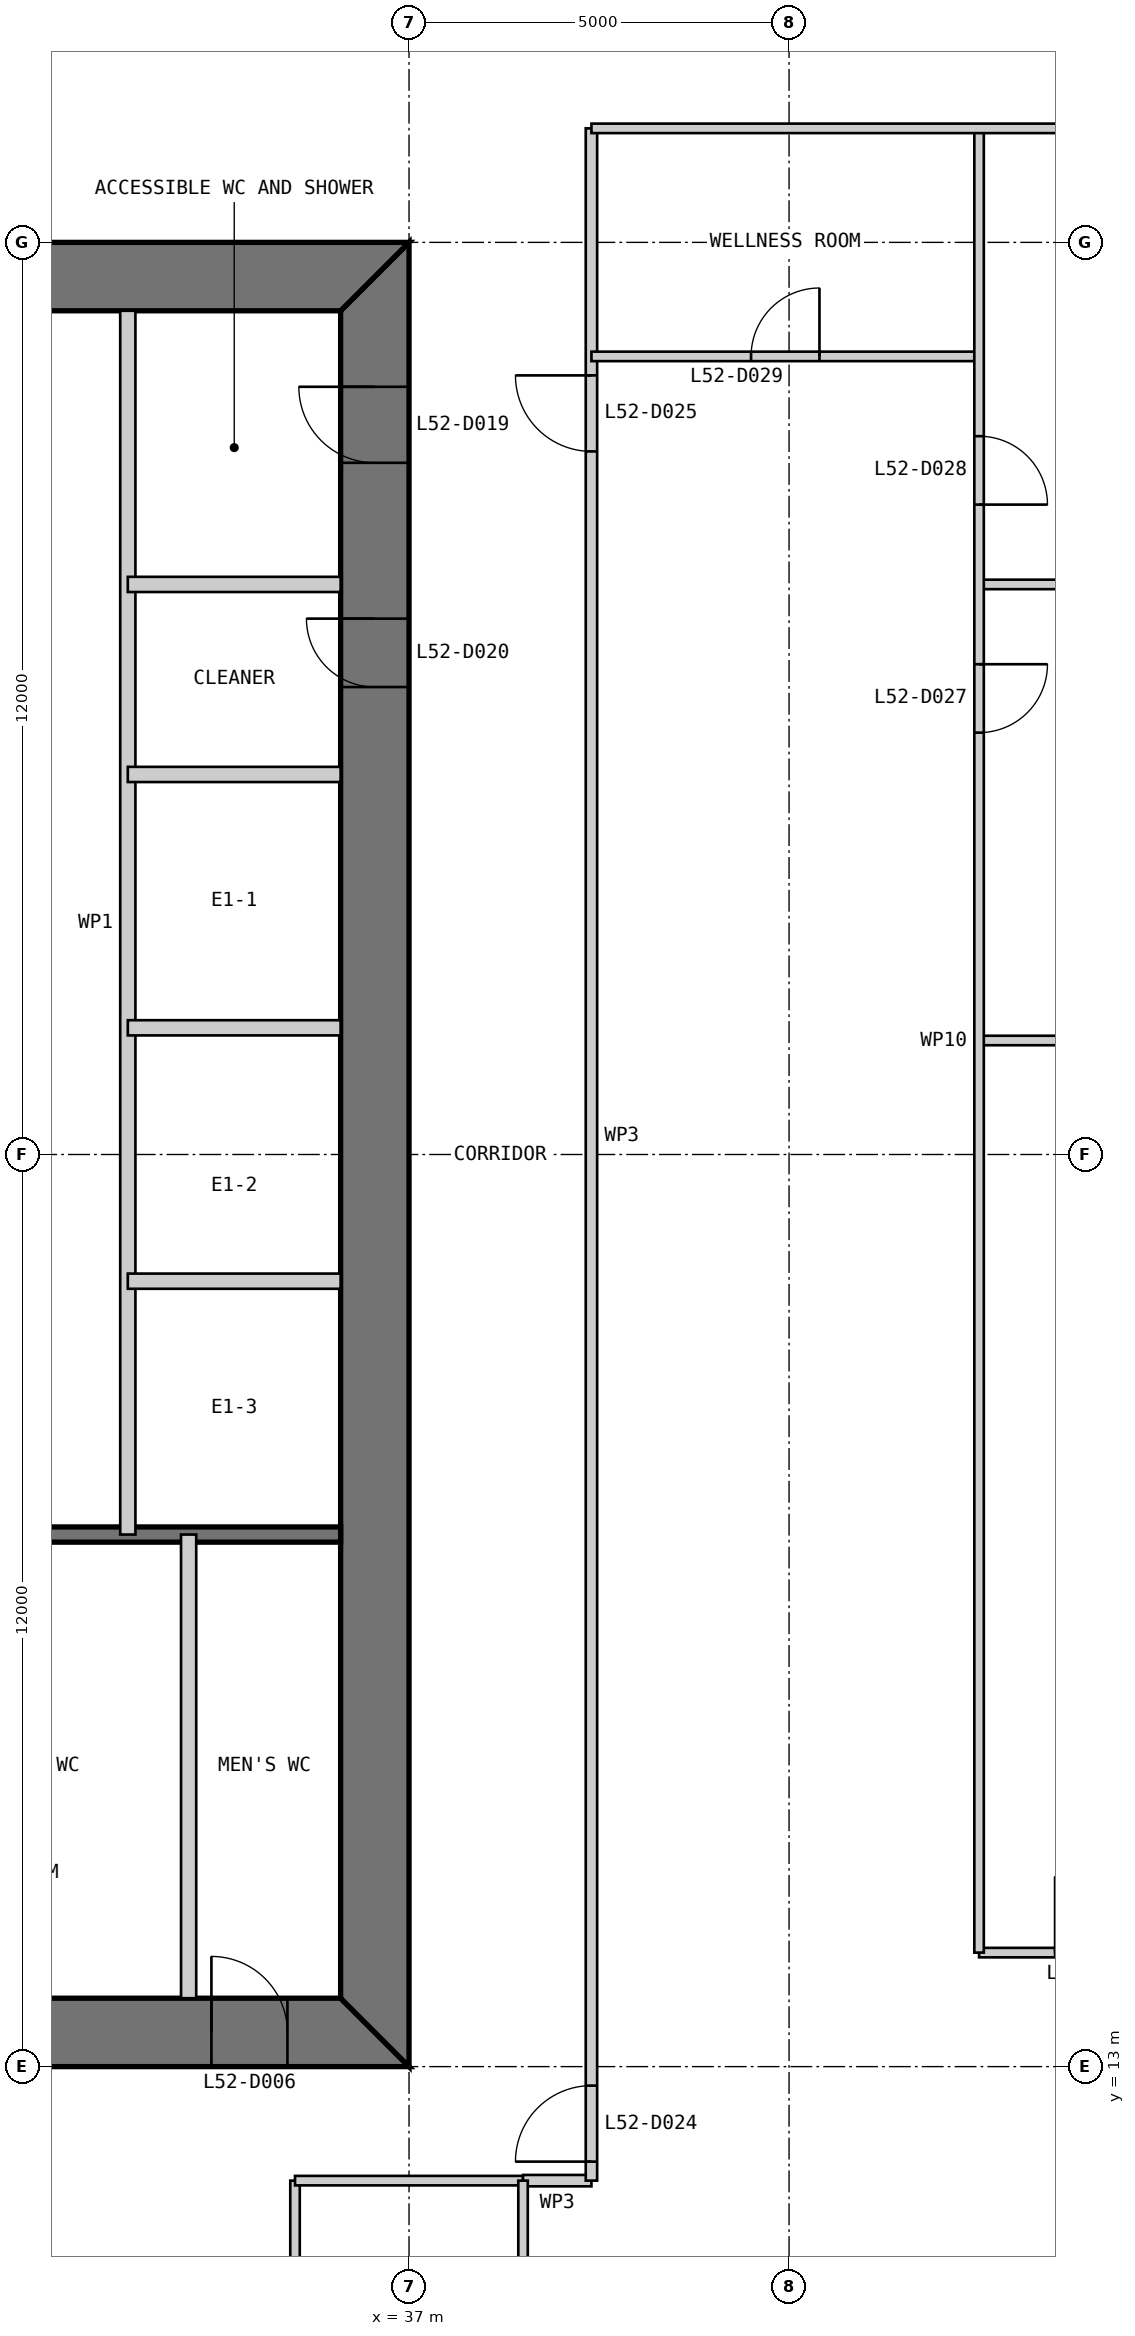
"""IFC4 building model, lengths in metres.
Left out: names, types, materials, properties, quantities, classifications, styles, units other than length and angle.
Written with IfcOpenShell. Run it as: python <this file> out.ifc"""

import sys

from ifc_helpers import new_model, si_unit, direction, frame, frame_2d, origin, place, context, subcontext, project, spatial, polyline, rectangle, outline, extrude, element, fill, save


model = new_model("IFC4")
c1 = context("Model", 3, precision=1e-05, world=origin(), true_north=direction((0.0, 1.0)))
c2 = subcontext(c1, "Body", "Model", "MODEL_VIEW")
j1 = project(units=[si_unit("LENGTHUNIT", "METRE"), si_unit("PLANEANGLEUNIT", "RADIAN")], contexts=[c1])
p1 = place(None, origin())
s1 = spatial("IfcSite", under=j1, at=p1, CompositionType="ELEMENT")
p2 = place(p1, origin())
s2 = spatial("IfcBuilding", under=s1, at=p2, CompositionType="ELEMENT")
p3 = place(p2, frame((0.0, 0.0, 221.8)))
s3 = spatial("IfcBuildingStorey", under=s2, at=p3, CompositionType="ELEMENT", Elevation=221.8)
p4 = place(p3, frame((13.0, 13.45, 0.0), z_axis=(0.0, 0.0, 1.0), x_axis=(1.0, 0.0, 0.0)))
e1 = element("IfcWall", 1, at=p4, inside=s3, PredefinedType="SHEAR", context=c2, shape_type="SweptSolid", body=[
    extrude(outline(polyline([(0.0, -0.45), (24.0, -0.45), (23.1, 0.45), (0.9, 0.45), (0.0, -0.45)])), origin(), (0.0, 0.0, 1.0), 4.0),
])
p5 = place(p4, frame((4.9, 0.0, 0.0)))
e2 = element("IfcOpeningElement", 2, at=p5, cuts=e1, PredefinedType="OPENING", context=c2, shape_type="SweptSolid", body=[
    extrude(rectangle(XDim=1.0, YDim=2.2, at=frame_2d((0.5, 1.1))), frame((0.0, 0.46, 0.0), z_axis=(0.0, -1.0, 0.0), x_axis=(1.0, 0.0, 0.0)), (0.0, 0.0, 1.0), 0.92),
])
p6 = place(p4, frame((8.9, 0.0, 0.0)))
e3 = element("IfcOpeningElement", 3, at=p6, cuts=e1, PredefinedType="OPENING", context=c2, shape_type="SweptSolid", body=[
    extrude(rectangle(XDim=1.1, YDim=2.2, at=frame_2d((0.55, 1.1))), frame((0.0, 0.46, 0.0), z_axis=(0.0, -1.0, 0.0), x_axis=(1.0, 0.0, 0.0)), (0.0, 0.0, 1.0), 0.92),
])
p7 = place(p4, frame((15.05, 0.0, 0.0)))
e4 = element("IfcOpeningElement", 4, at=p7, cuts=e1, PredefinedType="OPENING", context=c2, shape_type="SweptSolid", body=[
    extrude(rectangle(XDim=0.9, YDim=2.2, at=frame_2d((0.45, 1.1))), frame((0.0, 0.46, 0.0), z_axis=(0.0, -1.0, 0.0), x_axis=(1.0, 0.0, 0.0)), (0.0, 0.0, 1.0), 0.92),
])
p8 = place(p4, frame((17.9, 0.0, 0.0)))
e5 = element("IfcOpeningElement", 5, at=p8, cuts=e1, PredefinedType="OPENING", context=c2, shape_type="SweptSolid", body=[
    extrude(rectangle(XDim=1.0, YDim=2.2, at=frame_2d((0.5, 1.1))), frame((0.0, 0.46, 0.0), z_axis=(0.0, -1.0, 0.0), x_axis=(1.0, 0.0, 0.0)), (0.0, 0.0, 1.0), 0.92),
])
p9 = place(p4, frame((21.4, 0.0, 0.0)))
e6 = element("IfcOpeningElement", 6, at=p9, cuts=e1, PredefinedType="OPENING", context=c2, shape_type="SweptSolid", body=[
    extrude(rectangle(XDim=1.0, YDim=2.2, at=frame_2d((0.5, 1.1))), frame((0.0, 0.46, 0.0), z_axis=(0.0, -1.0, 0.0), x_axis=(1.0, 0.0, 0.0)), (0.0, 0.0, 1.0), 0.92),
])
p10 = place(p3, frame((36.55, 13.9, 0.0), z_axis=(0.0, 0.0, 1.0), x_axis=(0.0, 1.0, 0.0)))
e7 = element("IfcWall", 7, at=p10, inside=s3, PredefinedType="SHEAR", context=c2, shape_type="SweptSolid", body=[
    extrude(outline(polyline([(-0.9, -0.45), (23.1, -0.45), (22.2, 0.45), (0.0, 0.45), (-0.9, -0.45)])), origin(), (0.0, 0.0, 1.0), 4.0),
])
p11 = place(p10, frame((20.2, 0.0, 0.0)))
e8 = element("IfcOpeningElement", 8, at=p11, cuts=e7, PredefinedType="OPENING", context=c2, shape_type="SweptSolid", body=[
    extrude(rectangle(XDim=1.0, YDim=2.2, at=frame_2d((0.5, 1.1))), frame((0.0, 0.46, 0.0), z_axis=(0.0, -1.0, 0.0), x_axis=(1.0, 0.0, 0.0)), (0.0, 0.0, 1.0), 0.92),
])
p12 = place(p10, frame((17.25, 0.0, 0.0)))
e9 = element("IfcOpeningElement", 9, at=p12, cuts=e7, PredefinedType="OPENING", context=c2, shape_type="SweptSolid", body=[
    extrude(rectangle(XDim=0.9, YDim=2.2, at=frame_2d((0.45, 1.1))), frame((0.0, 0.46, 0.0), z_axis=(0.0, -1.0, 0.0), x_axis=(1.0, 0.0, 0.0)), (0.0, 0.0, 1.0), 0.92),
])
p13 = place(p3, frame((37.0, 36.55, 0.0), z_axis=(0.0, 0.0, 1.0), x_axis=(-1.0, 0.0, 0.0)))
e10 = element("IfcWall", 10, at=p13, inside=s3, PredefinedType="SHEAR", context=c2, shape_type="SweptSolid", body=[
    extrude(outline(polyline([(0.0, -0.45), (24.0, -0.45), (23.1, 0.45), (0.9, 0.45), (0.0, -0.45)])), origin(), (0.0, 0.0, 1.0), 4.0),
])
p14 = place(p13, frame((4.9, 0.0, 0.0)))
e11 = element("IfcOpeningElement", 11, at=p14, cuts=e10, PredefinedType="OPENING", context=c2, shape_type="SweptSolid", body=[
    extrude(rectangle(XDim=1.0, YDim=2.2, at=frame_2d((0.5, 1.1))), frame((0.0, 0.46, 0.0), z_axis=(0.0, -1.0, 0.0), x_axis=(1.0, 0.0, 0.0)), (0.0, 0.0, 1.0), 0.92),
])
p15 = place(p13, frame((8.9, 0.0, 0.0)))
e12 = element("IfcOpeningElement", 12, at=p15, cuts=e10, PredefinedType="OPENING", context=c2, shape_type="SweptSolid", body=[
    extrude(rectangle(XDim=1.1, YDim=2.2, at=frame_2d((0.55, 1.1))), frame((0.0, 0.46, 0.0), z_axis=(0.0, -1.0, 0.0), x_axis=(1.0, 0.0, 0.0)), (0.0, 0.0, 1.0), 0.92),
])
p16 = place(p13, frame((15.05, 0.0, 0.0)))
e13 = element("IfcOpeningElement", 13, at=p16, cuts=e10, PredefinedType="OPENING", context=c2, shape_type="SweptSolid", body=[
    extrude(rectangle(XDim=0.9, YDim=2.2, at=frame_2d((0.45, 1.1))), frame((0.0, 0.46, 0.0), z_axis=(0.0, -1.0, 0.0), x_axis=(1.0, 0.0, 0.0)), (0.0, 0.0, 1.0), 0.92),
])
p17 = place(p13, frame((17.9, 0.0, 0.0)))
e14 = element("IfcOpeningElement", 14, at=p17, cuts=e10, PredefinedType="OPENING", context=c2, shape_type="SweptSolid", body=[
    extrude(rectangle(XDim=1.0, YDim=2.2, at=frame_2d((0.5, 1.1))), frame((0.0, 0.46, 0.0), z_axis=(0.0, -1.0, 0.0), x_axis=(1.0, 0.0, 0.0)), (0.0, 0.0, 1.0), 0.92),
])
p18 = place(p13, frame((21.4, 0.0, 0.0)))
e15 = element("IfcOpeningElement", 15, at=p18, cuts=e10, PredefinedType="OPENING", context=c2, shape_type="SweptSolid", body=[
    extrude(rectangle(XDim=1.0, YDim=2.2, at=frame_2d((0.5, 1.1))), frame((0.0, 0.46, 0.0), z_axis=(0.0, -1.0, 0.0), x_axis=(1.0, 0.0, 0.0)), (0.0, 0.0, 1.0), 0.92),
])
p19 = place(p3, frame((20.3, 20.0, 0.0), z_axis=(0.0, 0.0, 1.0), x_axis=(1.0, 0.0, 0.0)))
e16 = element("IfcWall", 16, at=p19, inside=s3, PredefinedType="SOLIDWALL", context=c2, shape_type="SweptSolid", body=[
    extrude(rectangle(XDim=15.8, YDim=0.2, at=frame_2d((7.9, 0.0))), origin(), (0.0, 0.0, 1.0), 3.8),
])
p20 = place(p3, frame((34.1, 13.9, 0.0), z_axis=(0.0, 0.0, 1.0), x_axis=(0.0, 1.0, 0.0)))
e17 = element("IfcWall", 17, at=p20, inside=s3, PredefinedType="PARTITIONING", context=c2, shape_type="SweptSolid", body=[
    extrude(rectangle(XDim=6.1, YDim=0.2, at=frame_2d((3.05, 0.0))), origin(), (0.0, 0.0, 1.0), 3.8),
])
p21 = place(p3, frame((33.3, 36.1, 0.0), z_axis=(0.0, 0.0, 1.0), x_axis=(0.0, -1.0, 0.0)))
e18 = element("IfcWall", 18, at=p21, inside=s3, PredefinedType="PARTITIONING", context=c2, shape_type="SweptSolid", body=[
    extrude(rectangle(XDim=16.1, YDim=0.2, at=frame_2d((8.05, 0.0))), origin(), (0.0, 0.0, 1.0), 3.8),
])
for number, where, z_axis, x_axis in (
    (19, (36.1, 30.0, 0.0), (0.0, 0.0, 1.0), (-1.0, 0.0, 0.0)),
    (20, (36.1, 26.667, 0.0), (0.0, 0.0, 1.0), (-1.0, 0.0, 0.0)),
    (21, (36.1, 23.333, 0.0), (0.0, 0.0, 1.0), (-1.0, 0.0, 0.0)),
    (22, (36.1, 32.5, 0.0), (0.0, 0.0, 1.0), (-1.0, 0.0, 0.0)),
):
    element("IfcWall", number, at=place(p3, frame(where, z_axis=z_axis, x_axis=x_axis)), inside=s3, PredefinedType="PARTITIONING", context=c2, shape_type="SweptSolid", body=[
        extrude(rectangle(XDim=2.8, YDim=0.2, at=frame_2d((1.4, 0.0))), origin(), (0.0, 0.0, 1.0), 3.8),
    ])
p22 = place(p3, frame((35.5, 5.5, 0.0), z_axis=(0.0, 0.0, 1.0), x_axis=(0.0, 1.0, 0.0)))
e23 = element("IfcWall", 23, at=p22, inside=s3, PredefinedType="PARTITIONING", context=c2, shape_type="SweptSolid", body=[
    extrude(rectangle(XDim=6.0, YDim=0.125, at=frame_2d((3.0, 0.0))), origin(), (0.0, 0.0, 1.0), 3.85),
])
p23 = place(p22, frame((2.55, 0.0, 0.0)))
e24 = element("IfcOpeningElement", 24, at=p23, cuts=e23, PredefinedType="OPENING", context=c2, shape_type="SweptSolid", body=[
    extrude(rectangle(XDim=0.9, YDim=2.2, at=frame_2d((0.45, 1.1))), frame((0.0, 0.073, 0.0), z_axis=(0.0, -1.0, 0.0), x_axis=(1.0, 0.0, 0.0)), (0.0, 0.0, 1.0), 0.145),
])
p24 = place(p3, frame((35.5, 11.5, 0.0), z_axis=(0.0, 0.0, 1.0), x_axis=(1.0, 0.0, 0.0)))
e25 = element("IfcWall", 25, at=p24, inside=s3, PredefinedType="PARTITIONING", context=c2, shape_type="SweptSolid", body=[
    extrude(rectangle(XDim=3.0, YDim=0.125, at=frame_2d((1.5, 0.0))), origin(), (0.0, 0.0, 1.0), 3.85),
])
p25 = place(p3, frame((38.5, 11.5, 0.0), z_axis=(0.0, 0.0, 1.0), x_axis=(1.0, 0.0, 0.0)))
e26 = element("IfcWall", 26, at=p25, inside=s3, PredefinedType="PARTITIONING", context=c2, shape_type="SweptSolid", body=[
    extrude(rectangle(XDim=0.9, YDim=0.15, at=frame_2d((0.45, 0.0))), origin(), (0.0, 0.0, 1.0), 3.85),
])
p26 = place(p3, frame((39.4, 11.5, 0.0), z_axis=(0.0, 0.0, 1.0), x_axis=(0.0, 1.0, 0.0)))
e27 = element("IfcWall", 27, at=p26, inside=s3, PredefinedType="PARTITIONING", context=c2, shape_type="SweptSolid", body=[
    extrude(rectangle(XDim=27.0, YDim=0.15, at=frame_2d((13.5, 0.0))), origin(), (0.0, 0.0, 1.0), 3.85),
])
p27 = place(p26, frame((0.25, 0.0, 0.0)))
e28 = element("IfcOpeningElement", 28, at=p27, cuts=e27, PredefinedType="OPENING", context=c2, shape_type="SweptSolid", body=[
    extrude(rectangle(XDim=1.0, YDim=2.2, at=frame_2d((0.5, 1.1))), frame((0.0, 0.085, 0.0), z_axis=(0.0, -1.0, 0.0), x_axis=(1.0, 0.0, 0.0)), (0.0, 0.0, 1.0), 0.17),
])
p28 = place(p26, frame((22.75, 0.0, 0.0)))
e29 = element("IfcOpeningElement", 29, at=p28, cuts=e27, PredefinedType="OPENING", context=c2, shape_type="SweptSolid", body=[
    extrude(rectangle(XDim=1.0, YDim=2.2, at=frame_2d((0.5, 1.1))), frame((0.0, 0.085, 0.0), z_axis=(0.0, -1.0, 0.0), x_axis=(1.0, 0.0, 0.0)), (0.0, 0.0, 1.0), 0.17),
])
p29 = place(p3, frame((38.5, 0.15, 0.0), z_axis=(0.0, 0.0, 1.0), x_axis=(0.0, 1.0, 0.0)))
e30 = element("IfcWall", 30, at=p29, inside=s3, PredefinedType="PARTITIONING", context=c2, shape_type="SweptSolid", body=[
    extrude(rectangle(XDim=11.35, YDim=0.125, at=frame_2d((5.675, 0.0))), origin(), (0.0, 0.0, 1.0), 3.85),
])
p30 = place(p3, frame((49.85, 14.5, 0.0), z_axis=(0.0, 0.0, 1.0), x_axis=(-1.0, 0.0, 0.0)))
e31 = element("IfcWall", 31, at=p30, inside=s3, PredefinedType="PARTITIONING", context=c2, shape_type="SweptSolid", body=[
    extrude(rectangle(XDim=5.35, YDim=0.125, at=frame_2d((2.675, 0.0))), origin(), (0.0, 0.0, 1.0), 3.85),
])
p31 = place(p30, frame((3.35, 0.0, 0.0)))
e32 = element("IfcOpeningElement", 32, at=p31, cuts=e31, PredefinedType="OPENING", context=c2, shape_type="SweptSolid", body=[
    extrude(rectangle(XDim=1.0, YDim=2.2, at=frame_2d((0.5, 1.1))), frame((0.0, 0.073, 0.0), z_axis=(0.0, -1.0, 0.0), x_axis=(1.0, 0.0, 0.0)), (0.0, 0.0, 1.0), 0.145),
])
for number, where, z_axis, x_axis in (
    (33, (49.85, 26.5, 0.0), (0.0, 0.0, 1.0), (-1.0, 0.0, 0.0)),
    (34, (49.85, 32.5, 0.0), (0.0, 0.0, 1.0), (-1.0, 0.0, 0.0)),
):
    element("IfcWall", number, at=place(p3, frame(where, z_axis=z_axis, x_axis=x_axis)), inside=s3, PredefinedType="PARTITIONING", context=c2, shape_type="SweptSolid", body=[
        extrude(rectangle(XDim=5.35, YDim=0.125, at=frame_2d((2.675, 0.0))), origin(), (0.0, 0.0, 1.0), 3.85),
    ])
p32 = place(p3, frame((44.5, 35.5, 0.0), z_axis=(0.0, 0.0, 1.0), x_axis=(-1.0, 0.0, 0.0)))
e35 = element("IfcWall", 35, at=p32, inside=s3, PredefinedType="PARTITIONING", context=c2, shape_type="SweptSolid", body=[
    extrude(rectangle(XDim=5.1, YDim=0.125, at=frame_2d((2.55, 0.0))), origin(), (0.0, 0.0, 1.0), 3.85),
])
p33 = place(p32, frame((2.1, 0.0, 0.0)))
e36 = element("IfcOpeningElement", 36, at=p33, cuts=e35, PredefinedType="OPENING", context=c2, shape_type="SweptSolid", body=[
    extrude(rectangle(XDim=0.9, YDim=2.2, at=frame_2d((0.45, 1.1))), frame((0.0, 0.073, 0.0), z_axis=(0.0, -1.0, 0.0), x_axis=(1.0, 0.0, 0.0)), (0.0, 0.0, 1.0), 0.145),
])
p34 = place(p3, frame((44.5, 14.5, 0.0), z_axis=(0.0, 0.0, 1.0), x_axis=(0.0, 1.0, 0.0)))
e37 = element("IfcWall", 37, at=p34, inside=s3, PredefinedType="PARTITIONING", context=c2, shape_type="SweptSolid", body=[
    extrude(rectangle(XDim=24.0, YDim=0.125, at=frame_2d((12.0, 0.0))), origin(), (0.0, 0.0, 1.0), 3.85),
])
p35 = place(p34, frame((16.05, 0.0, 0.0)))
e38 = element("IfcOpeningElement", 38, at=p35, cuts=e37, PredefinedType="OPENING", context=c2, shape_type="SweptSolid", body=[
    extrude(rectangle(XDim=0.9, YDim=2.2, at=frame_2d((0.45, 1.1))), frame((0.0, 0.073, 0.0), z_axis=(0.0, -1.0, 0.0), x_axis=(1.0, 0.0, 0.0)), (0.0, 0.0, 1.0), 0.145),
])
p36 = place(p34, frame((19.05, 0.0, 0.0)))
e39 = element("IfcOpeningElement", 39, at=p36, cuts=e37, PredefinedType="OPENING", context=c2, shape_type="SweptSolid", body=[
    extrude(rectangle(XDim=0.9, YDim=2.2, at=frame_2d((0.45, 1.1))), frame((0.0, 0.073, 0.0), z_axis=(0.0, -1.0, 0.0), x_axis=(1.0, 0.0, 0.0)), (0.0, 0.0, 1.0), 0.145),
])
p37 = place(p3, frame((49.85, 38.5, 0.0), z_axis=(0.0, 0.0, 1.0), x_axis=(-1.0, 0.0, 0.0)))
e40 = element("IfcWall", 40, at=p37, inside=s3, PredefinedType="PARTITIONING", context=c2, shape_type="SweptSolid", body=[
    extrude(rectangle(XDim=10.45, YDim=0.125, at=frame_2d((5.225, 0.0))), origin(), (0.0, 0.0, 1.0), 3.85),
])
p38 = place(p9, origin())
e41 = element("IfcDoor", 41, at=p38, inside=s3, OperationType="SINGLE_SWING_LEFT", PredefinedType="DOOR", context=c2, shape_type="SweptSolid", body=[
    extrude(rectangle(XDim=1.0, YDim=2.2, at=frame_2d((0.5, 1.1))), frame((0.0, 0.025, 0.0), z_axis=(0.0, -1.0, 0.0), x_axis=(1.0, 0.0, 0.0)), (0.0, 0.0, 1.0), 0.05),
    extrude(outline(polyline([(0.0, 0.0), (0.04, 0.0), (0.04, 2.16), (0.96, 2.16), (0.96, 0.0), (1.0, 0.0), (1.0, 2.2), (0.0, 2.2), (0.0, 0.0)])), frame((0.0, 0.3, 0.0), z_axis=(0.0, -1.0, 0.0), x_axis=(1.0, 0.0, 0.0)), (0.0, 0.0, 1.0), 0.6),
])
fill(e6, e41)
p39 = place(p11, origin())
e42 = element("IfcDoor", 42, at=p39, inside=s3, OperationType="SINGLE_SWING_RIGHT", PredefinedType="DOOR", context=c2, shape_type="SweptSolid", body=[
    extrude(rectangle(XDim=1.0, YDim=2.2, at=frame_2d((0.5, 1.1))), frame((0.0, 0.025, 0.0), z_axis=(0.0, -1.0, 0.0), x_axis=(1.0, 0.0, 0.0)), (0.0, 0.0, 1.0), 0.05),
    extrude(outline(polyline([(0.0, 0.0), (0.04, 0.0), (0.04, 2.16), (0.96, 2.16), (0.96, 0.0), (1.0, 0.0), (1.0, 2.2), (0.0, 2.2), (0.0, 0.0)])), frame((0.0, 0.3, 0.0), z_axis=(0.0, -1.0, 0.0), x_axis=(1.0, 0.0, 0.0)), (0.0, 0.0, 1.0), 0.6),
])
fill(e8, e42)
p40 = place(p12, origin())
e43 = element("IfcDoor", 43, at=p40, inside=s3, OperationType="SINGLE_SWING_RIGHT", PredefinedType="DOOR", context=c2, shape_type="SweptSolid", body=[
    extrude(rectangle(XDim=0.9, YDim=2.2, at=frame_2d((0.45, 1.1))), frame((0.0, 0.025, 0.0), z_axis=(0.0, -1.0, 0.0), x_axis=(1.0, 0.0, 0.0)), (0.0, 0.0, 1.0), 0.05),
    extrude(outline(polyline([(0.0, 0.0), (0.04, 0.0), (0.04, 2.16), (0.86, 2.16), (0.86, 0.0), (0.9, 0.0), (0.9, 2.2), (0.0, 2.2), (0.0, 0.0)])), frame((0.0, 0.3, 0.0), z_axis=(0.0, -1.0, 0.0), x_axis=(1.0, 0.0, 0.0)), (0.0, 0.0, 1.0), 0.6),
])
fill(e9, e43)
p41 = place(p27, origin())
e44 = element("IfcDoor", 44, at=p41, inside=s3, OperationType="SINGLE_SWING_LEFT", PredefinedType="DOOR", context=c2, shape_type="SweptSolid", body=[
    extrude(rectangle(XDim=1.0, YDim=2.2, at=frame_2d((0.5, 1.1))), frame((0.0, 0.025, 0.0), z_axis=(0.0, -1.0, 0.0), x_axis=(1.0, 0.0, 0.0)), (0.0, 0.0, 1.0), 0.05),
])
fill(e28, e44)
p42 = place(p28, origin())
e45 = element("IfcDoor", 45, at=p42, inside=s3, OperationType="SINGLE_SWING_RIGHT", PredefinedType="DOOR", context=c2, shape_type="SweptSolid", body=[
    extrude(rectangle(XDim=1.0, YDim=2.2, at=frame_2d((0.5, 1.1))), frame((0.0, 0.025, 0.0), z_axis=(0.0, -1.0, 0.0), x_axis=(1.0, 0.0, 0.0)), (0.0, 0.0, 1.0), 0.05),
])
fill(e29, e45)
p43 = place(p35, frame((0.9, 0.0, 0.0), z_axis=(0.0, 0.0, 1.0), x_axis=(-1.0, 0.0, 0.0)))
e46 = element("IfcDoor", 46, at=p43, inside=s3, OperationType="SINGLE_SWING_LEFT", PredefinedType="DOOR", context=c2, shape_type="SweptSolid", body=[
    extrude(rectangle(XDim=0.9, YDim=2.2, at=frame_2d((0.45, 1.1))), frame((0.0, 0.025, 0.0), z_axis=(0.0, -1.0, 0.0), x_axis=(1.0, 0.0, 0.0)), (0.0, 0.0, 1.0), 0.05),
])
fill(e38, e46)
p44 = place(p36, frame((0.9, 0.0, 0.0), z_axis=(0.0, 0.0, 1.0), x_axis=(-1.0, 0.0, 0.0)))
e47 = element("IfcDoor", 47, at=p44, inside=s3, OperationType="SINGLE_SWING_RIGHT", PredefinedType="DOOR", context=c2, shape_type="SweptSolid", body=[
    extrude(rectangle(XDim=0.9, YDim=2.2, at=frame_2d((0.45, 1.1))), frame((0.0, 0.025, 0.0), z_axis=(0.0, -1.0, 0.0), x_axis=(1.0, 0.0, 0.0)), (0.0, 0.0, 1.0), 0.05),
])
fill(e39, e47)
p45 = place(p33, frame((0.9, 0.0, 0.0), z_axis=(0.0, 0.0, 1.0), x_axis=(-1.0, 0.0, 0.0)))
e48 = element("IfcDoor", 48, at=p45, inside=s3, OperationType="SINGLE_SWING_RIGHT", PredefinedType="DOOR", context=c2, shape_type="SweptSolid", body=[
    extrude(rectangle(XDim=0.9, YDim=2.2, at=frame_2d((0.45, 1.1))), frame((0.0, 0.025, 0.0), z_axis=(0.0, -1.0, 0.0), x_axis=(1.0, 0.0, 0.0)), (0.0, 0.0, 1.0), 0.05),
])
fill(e36, e48)
save(model, sys.argv[1])
